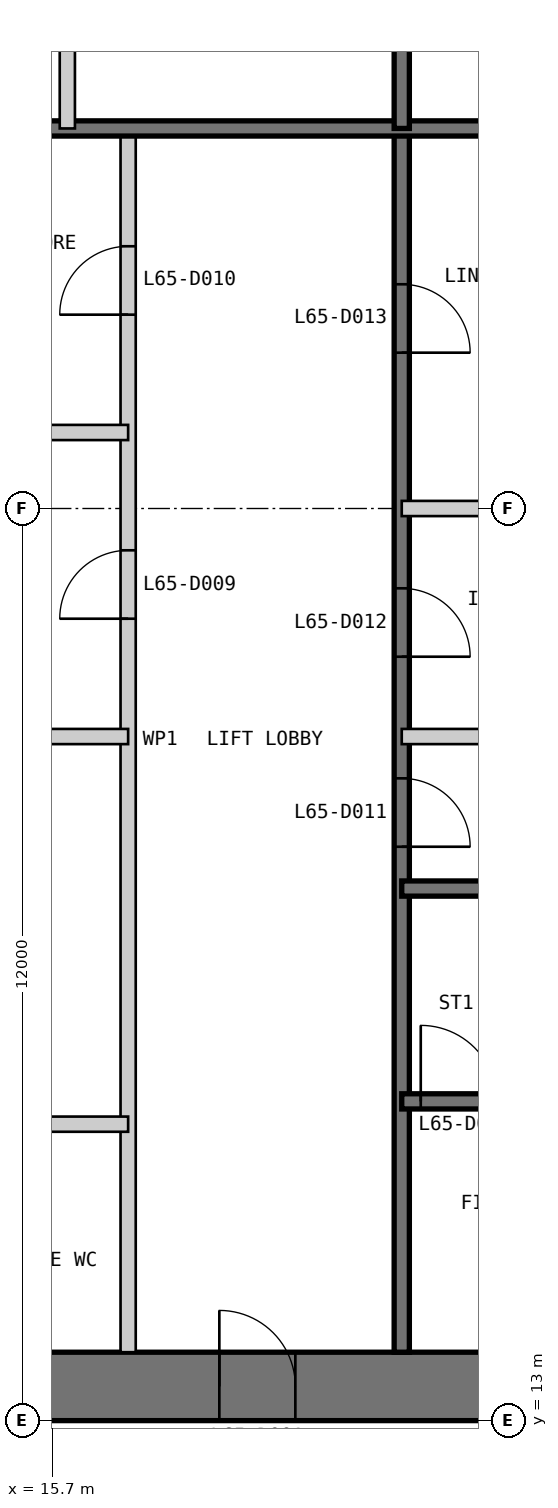
"""IFC4 building model, lengths in metres.
Left out: names, types, materials, properties, quantities, classifications, styles, units other than length and angle.
Written with IfcOpenShell. Run it as: python <this file> out.ifc"""

import sys

from ifc_helpers import new_model, si_unit, direction, frame, frame_2d, origin, place, context, subcontext, project, spatial, polyline, rectangle, outline, extrude, element, fill, save


model = new_model("IFC4")
c1 = context("Model", 3, precision=1e-05, world=origin(), true_north=direction((0.0, 1.0)))
c2 = subcontext(c1, "Body", "Model", "MODEL_VIEW")
j1 = project(units=[si_unit("LENGTHUNIT", "METRE"), si_unit("PLANEANGLEUNIT", "RADIAN")], contexts=[c1])
p1 = place(None, origin())
s1 = spatial("IfcSite", under=j1, at=p1, CompositionType="ELEMENT")
p2 = place(p1, origin())
s2 = spatial("IfcBuilding", under=s1, at=p2, CompositionType="ELEMENT")
p3 = place(p2, frame((0.0, 0.0, 273.0)))
s3 = spatial("IfcBuildingStorey", under=s2, at=p3, CompositionType="ELEMENT", Elevation=273.0)
p4 = place(p3, frame((13.0, 13.45, 0.0), z_axis=(0.0, 0.0, 1.0), x_axis=(1.0, 0.0, 0.0)))
e1 = element("IfcWall", 1, at=p4, inside=s3, PredefinedType="SHEAR", context=c2, shape_type="SweptSolid", body=[
    extrude(outline(polyline([(0.0, -0.45), (24.0, -0.45), (23.1, 0.45), (0.9, 0.45), (0.0, -0.45)])), origin(), (0.0, 0.0, 1.0), 3.4),
])
p5 = place(p4, frame((4.9, 0.0, 0.0)))
e2 = element("IfcOpeningElement", 2, at=p5, cuts=e1, PredefinedType="OPENING", context=c2, shape_type="SweptSolid", body=[
    extrude(rectangle(XDim=1.0, YDim=2.2, at=frame_2d((0.5, 1.1))), frame((0.0, 0.46, 0.0), z_axis=(0.0, -1.0, 0.0), x_axis=(1.0, 0.0, 0.0)), (0.0, 0.0, 1.0), 0.92),
])
p6 = place(p4, frame((8.9, 0.0, 0.0)))
e3 = element("IfcOpeningElement", 3, at=p6, cuts=e1, PredefinedType="OPENING", context=c2, shape_type="SweptSolid", body=[
    extrude(rectangle(XDim=1.1, YDim=2.2, at=frame_2d((0.55, 1.1))), frame((0.0, 0.46, 0.0), z_axis=(0.0, -1.0, 0.0), x_axis=(1.0, 0.0, 0.0)), (0.0, 0.0, 1.0), 0.92),
])
p7 = place(p4, frame((15.05, 0.0, 0.0)))
e4 = element("IfcOpeningElement", 4, at=p7, cuts=e1, PredefinedType="OPENING", context=c2, shape_type="SweptSolid", body=[
    extrude(rectangle(XDim=0.9, YDim=2.2, at=frame_2d((0.45, 1.1))), frame((0.0, 0.46, 0.0), z_axis=(0.0, -1.0, 0.0), x_axis=(1.0, 0.0, 0.0)), (0.0, 0.0, 1.0), 0.92),
])
p8 = place(p4, frame((17.9, 0.0, 0.0)))
e5 = element("IfcOpeningElement", 5, at=p8, cuts=e1, PredefinedType="OPENING", context=c2, shape_type="SweptSolid", body=[
    extrude(rectangle(XDim=1.0, YDim=2.2, at=frame_2d((0.5, 1.1))), frame((0.0, 0.46, 0.0), z_axis=(0.0, -1.0, 0.0), x_axis=(1.0, 0.0, 0.0)), (0.0, 0.0, 1.0), 0.92),
])
p9 = place(p4, frame((21.4, 0.0, 0.0)))
e6 = element("IfcOpeningElement", 6, at=p9, cuts=e1, PredefinedType="OPENING", context=c2, shape_type="SweptSolid", body=[
    extrude(rectangle(XDim=1.0, YDim=2.2, at=frame_2d((0.5, 1.1))), frame((0.0, 0.46, 0.0), z_axis=(0.0, -1.0, 0.0), x_axis=(1.0, 0.0, 0.0)), (0.0, 0.0, 1.0), 0.92),
])
p10 = place(p3, frame((16.7, 13.9, 0.0), z_axis=(0.0, 0.0, 1.0), x_axis=(0.0, 1.0, 0.0)))
e7 = element("IfcWall", 7, at=p10, inside=s3, PredefinedType="PARTITIONING", context=c2, shape_type="SweptSolid", body=[
    extrude(rectangle(XDim=16.1, YDim=0.2, at=frame_2d((8.05, 0.0))), origin(), (0.0, 0.0, 1.0), 3.2),
])
p11 = place(p10, frame((9.65, 0.0, 0.0)))
e8 = element("IfcOpeningElement", 8, at=p11, cuts=e7, PredefinedType="OPENING", context=c2, shape_type="SweptSolid", body=[
    extrude(rectangle(XDim=0.9, YDim=2.2, at=frame_2d((0.45, 1.1))), frame((0.0, 0.11, 0.0), z_axis=(0.0, -1.0, 0.0), x_axis=(1.0, 0.0, 0.0)), (0.0, 0.0, 1.0), 0.22),
])
p12 = place(p10, frame((13.65, 0.0, 0.0)))
e9 = element("IfcOpeningElement", 9, at=p12, cuts=e7, PredefinedType="OPENING", context=c2, shape_type="SweptSolid", body=[
    extrude(rectangle(XDim=0.9, YDim=2.2, at=frame_2d((0.45, 1.1))), frame((0.0, 0.11, 0.0), z_axis=(0.0, -1.0, 0.0), x_axis=(1.0, 0.0, 0.0)), (0.0, 0.0, 1.0), 0.22),
])
p13 = place(p3, frame((20.3, 13.9, 0.0), z_axis=(0.0, 0.0, 1.0), x_axis=(0.0, 1.0, 0.0)))
e10 = element("IfcWall", 10, at=p13, inside=s3, PredefinedType="SOLIDWALL", context=c2, shape_type="SweptSolid", body=[
    extrude(rectangle(XDim=16.1, YDim=0.2, at=frame_2d((8.05, 0.0))), origin(), (0.0, 0.0, 1.0), 3.2),
])
p14 = place(p13, frame((6.65, 0.0, 0.0)))
e11 = element("IfcOpeningElement", 11, at=p14, cuts=e10, PredefinedType="OPENING", context=c2, shape_type="SweptSolid", body=[
    extrude(rectangle(XDim=0.9, YDim=2.2, at=frame_2d((0.45, 1.1))), frame((0.0, 0.11, 0.0), z_axis=(0.0, -1.0, 0.0), x_axis=(1.0, 0.0, 0.0)), (0.0, 0.0, 1.0), 0.22),
])
p15 = place(p13, frame((9.15, 0.0, 0.0)))
e12 = element("IfcOpeningElement", 12, at=p15, cuts=e10, PredefinedType="OPENING", context=c2, shape_type="SweptSolid", body=[
    extrude(rectangle(XDim=0.9, YDim=2.2, at=frame_2d((0.45, 1.1))), frame((0.0, 0.11, 0.0), z_axis=(0.0, -1.0, 0.0), x_axis=(1.0, 0.0, 0.0)), (0.0, 0.0, 1.0), 0.22),
])
p16 = place(p13, frame((13.15, 0.0, 0.0)))
e13 = element("IfcOpeningElement", 13, at=p16, cuts=e10, PredefinedType="OPENING", context=c2, shape_type="SweptSolid", body=[
    extrude(rectangle(XDim=0.9, YDim=2.2, at=frame_2d((0.45, 1.1))), frame((0.0, 0.11, 0.0), z_axis=(0.0, -1.0, 0.0), x_axis=(1.0, 0.0, 0.0)), (0.0, 0.0, 1.0), 0.22),
])
p17 = place(p3, frame((20.3, 17.2, 0.0), z_axis=(0.0, 0.0, 1.0), x_axis=(1.0, 0.0, 0.0)))
e14 = element("IfcWall", 14, at=p17, inside=s3, PredefinedType="SOLIDWALL", context=c2, shape_type="SweptSolid", body=[
    extrude(rectangle(XDim=9.4, YDim=0.2, at=frame_2d((4.7, 0.0))), origin(), (0.0, 0.0, 1.0), 3.2),
])
p18 = place(p17, frame((0.25, 0.0, 0.0)))
e15 = element("IfcOpeningElement", 15, at=p18, cuts=e14, PredefinedType="OPENING", context=c2, shape_type="SweptSolid", body=[
    extrude(rectangle(XDim=1.0, YDim=2.2, at=frame_2d((0.5, 1.1))), frame((0.0, 0.11, 0.0), z_axis=(0.0, -1.0, 0.0), x_axis=(1.0, 0.0, 0.0)), (0.0, 0.0, 1.0), 0.22),
])
p19 = place(p3, frame((20.3, 20.0, 0.0), z_axis=(0.0, 0.0, 1.0), x_axis=(1.0, 0.0, 0.0)))
e16 = element("IfcWall", 16, at=p19, inside=s3, PredefinedType="SOLIDWALL", context=c2, shape_type="SweptSolid", body=[
    extrude(rectangle(XDim=15.8, YDim=0.2, at=frame_2d((7.9, 0.0))), origin(), (0.0, 0.0, 1.0), 3.2),
])
for number, where, z_axis, x_axis in (
    (17, (13.9, 16.9, 0.0), (0.0, 0.0, 1.0), (1.0, 0.0, 0.0)),
    (18, (13.9, 22.0, 0.0), (0.0, 0.0, 1.0), (1.0, 0.0, 0.0)),
    (19, (13.9, 26.0, 0.0), (0.0, 0.0, 1.0), (1.0, 0.0, 0.0)),
    (20, (20.3, 22.0, 0.0), (0.0, 0.0, 1.0), (1.0, 0.0, 0.0)),
    (21, (20.3, 25.0, 0.0), (0.0, 0.0, 1.0), (1.0, 0.0, 0.0)),
):
    element("IfcWall", number, at=place(p3, frame(where, z_axis=z_axis, x_axis=x_axis)), inside=s3, PredefinedType="PARTITIONING", context=c2, shape_type="SweptSolid", body=[
        extrude(rectangle(XDim=2.8, YDim=0.2, at=frame_2d((1.4, 0.0))), origin(), (0.0, 0.0, 1.0), 3.2),
    ])
p20 = place(p3, frame((29.7, 30.0, 0.0), z_axis=(0.0, 0.0, 1.0), x_axis=(-1.0, 0.0, 0.0)))
e22 = element("IfcWall", 22, at=p20, inside=s3, PredefinedType="SOLIDWALL", context=c2, shape_type="SweptSolid", body=[
    extrude(rectangle(XDim=15.8, YDim=0.2, at=frame_2d((7.9, 0.0))), origin(), (0.0, 0.0, 1.0), 3.2),
])
p21 = place(p3, frame((20.3, 36.1, 0.0), z_axis=(0.0, 0.0, 1.0), x_axis=(0.0, -1.0, 0.0)))
e23 = element("IfcWall", 23, at=p21, inside=s3, PredefinedType="SOLIDWALL", context=c2, shape_type="SweptSolid", body=[
    extrude(rectangle(XDim=6.1, YDim=0.2, at=frame_2d((3.05, 0.0))), origin(), (0.0, 0.0, 1.0), 3.2),
])
p22 = place(p3, frame((15.9, 36.1, 0.0), z_axis=(0.0, 0.0, 1.0), x_axis=(0.0, -1.0, 0.0)))
e24 = element("IfcWall", 24, at=p22, inside=s3, PredefinedType="PARTITIONING", context=c2, shape_type="SweptSolid", body=[
    extrude(rectangle(XDim=6.1, YDim=0.2, at=frame_2d((3.05, 0.0))), origin(), (0.0, 0.0, 1.0), 3.2),
])
p23 = place(p5, origin())
e25 = element("IfcDoor", 25, at=p23, inside=s3, OperationType="SINGLE_SWING_LEFT", PredefinedType="DOOR", context=c2, shape_type="SweptSolid", body=[
    extrude(rectangle(XDim=1.0, YDim=2.2, at=frame_2d((0.5, 1.1))), frame((0.0, 0.025, 0.0), z_axis=(0.0, -1.0, 0.0), x_axis=(1.0, 0.0, 0.0)), (0.0, 0.0, 1.0), 0.05),
    extrude(outline(polyline([(0.0, 0.0), (0.04, 0.0), (0.04, 2.16), (0.96, 2.16), (0.96, 0.0), (1.0, 0.0), (1.0, 2.2), (0.0, 2.2), (0.0, 0.0)])), frame((0.0, 0.3, 0.0), z_axis=(0.0, -1.0, 0.0), x_axis=(1.0, 0.0, 0.0)), (0.0, 0.0, 1.0), 0.6),
])
fill(e2, e25)
p24 = place(p18, origin())
e26 = element("IfcDoor", 26, at=p24, inside=s3, OperationType="SINGLE_SWING_LEFT", PredefinedType="DOOR", context=c2, shape_type="SweptSolid", body=[
    extrude(rectangle(XDim=1.0, YDim=2.2, at=frame_2d((0.5, 1.1))), frame((0.0, 0.025, 0.0), z_axis=(0.0, -1.0, 0.0), x_axis=(1.0, 0.0, 0.0)), (0.0, 0.0, 1.0), 0.05),
])
fill(e15, e26)
p25 = place(p11, origin())
e27 = element("IfcDoor", 27, at=p25, inside=s3, OperationType="SINGLE_SWING_LEFT", PredefinedType="DOOR", context=c2, shape_type="SweptSolid", body=[
    extrude(rectangle(XDim=0.9, YDim=2.2, at=frame_2d((0.45, 1.1))), frame((0.0, 0.025, 0.0), z_axis=(0.0, -1.0, 0.0), x_axis=(1.0, 0.0, 0.0)), (0.0, 0.0, 1.0), 0.05),
])
fill(e8, e27)
p26 = place(p12, origin())
e28 = element("IfcDoor", 28, at=p26, inside=s3, OperationType="SINGLE_SWING_LEFT", PredefinedType="DOOR", context=c2, shape_type="SweptSolid", body=[
    extrude(rectangle(XDim=0.9, YDim=2.2, at=frame_2d((0.45, 1.1))), frame((0.0, 0.025, 0.0), z_axis=(0.0, -1.0, 0.0), x_axis=(1.0, 0.0, 0.0)), (0.0, 0.0, 1.0), 0.05),
])
fill(e9, e28)
p27 = place(p14, frame((0.9, 0.0, 0.0), z_axis=(0.0, 0.0, 1.0), x_axis=(-1.0, 0.0, 0.0)))
e29 = element("IfcDoor", 29, at=p27, inside=s3, OperationType="SINGLE_SWING_RIGHT", PredefinedType="DOOR", context=c2, shape_type="SweptSolid", body=[
    extrude(rectangle(XDim=0.9, YDim=2.2, at=frame_2d((0.45, 1.1))), frame((0.0, 0.025, 0.0), z_axis=(0.0, -1.0, 0.0), x_axis=(1.0, 0.0, 0.0)), (0.0, 0.0, 1.0), 0.05),
])
fill(e11, e29)
p28 = place(p15, frame((0.9, 0.0, 0.0), z_axis=(0.0, 0.0, 1.0), x_axis=(-1.0, 0.0, 0.0)))
e30 = element("IfcDoor", 30, at=p28, inside=s3, OperationType="SINGLE_SWING_RIGHT", PredefinedType="DOOR", context=c2, shape_type="SweptSolid", body=[
    extrude(rectangle(XDim=0.9, YDim=2.2, at=frame_2d((0.45, 1.1))), frame((0.0, 0.025, 0.0), z_axis=(0.0, -1.0, 0.0), x_axis=(1.0, 0.0, 0.0)), (0.0, 0.0, 1.0), 0.05),
])
fill(e12, e30)
p29 = place(p16, frame((0.9, 0.0, 0.0), z_axis=(0.0, 0.0, 1.0), x_axis=(-1.0, 0.0, 0.0)))
e31 = element("IfcDoor", 31, at=p29, inside=s3, OperationType="SINGLE_SWING_RIGHT", PredefinedType="DOOR", context=c2, shape_type="SweptSolid", body=[
    extrude(rectangle(XDim=0.9, YDim=2.2, at=frame_2d((0.45, 1.1))), frame((0.0, 0.025, 0.0), z_axis=(0.0, -1.0, 0.0), x_axis=(1.0, 0.0, 0.0)), (0.0, 0.0, 1.0), 0.05),
])
fill(e13, e31)
save(model, sys.argv[1])
